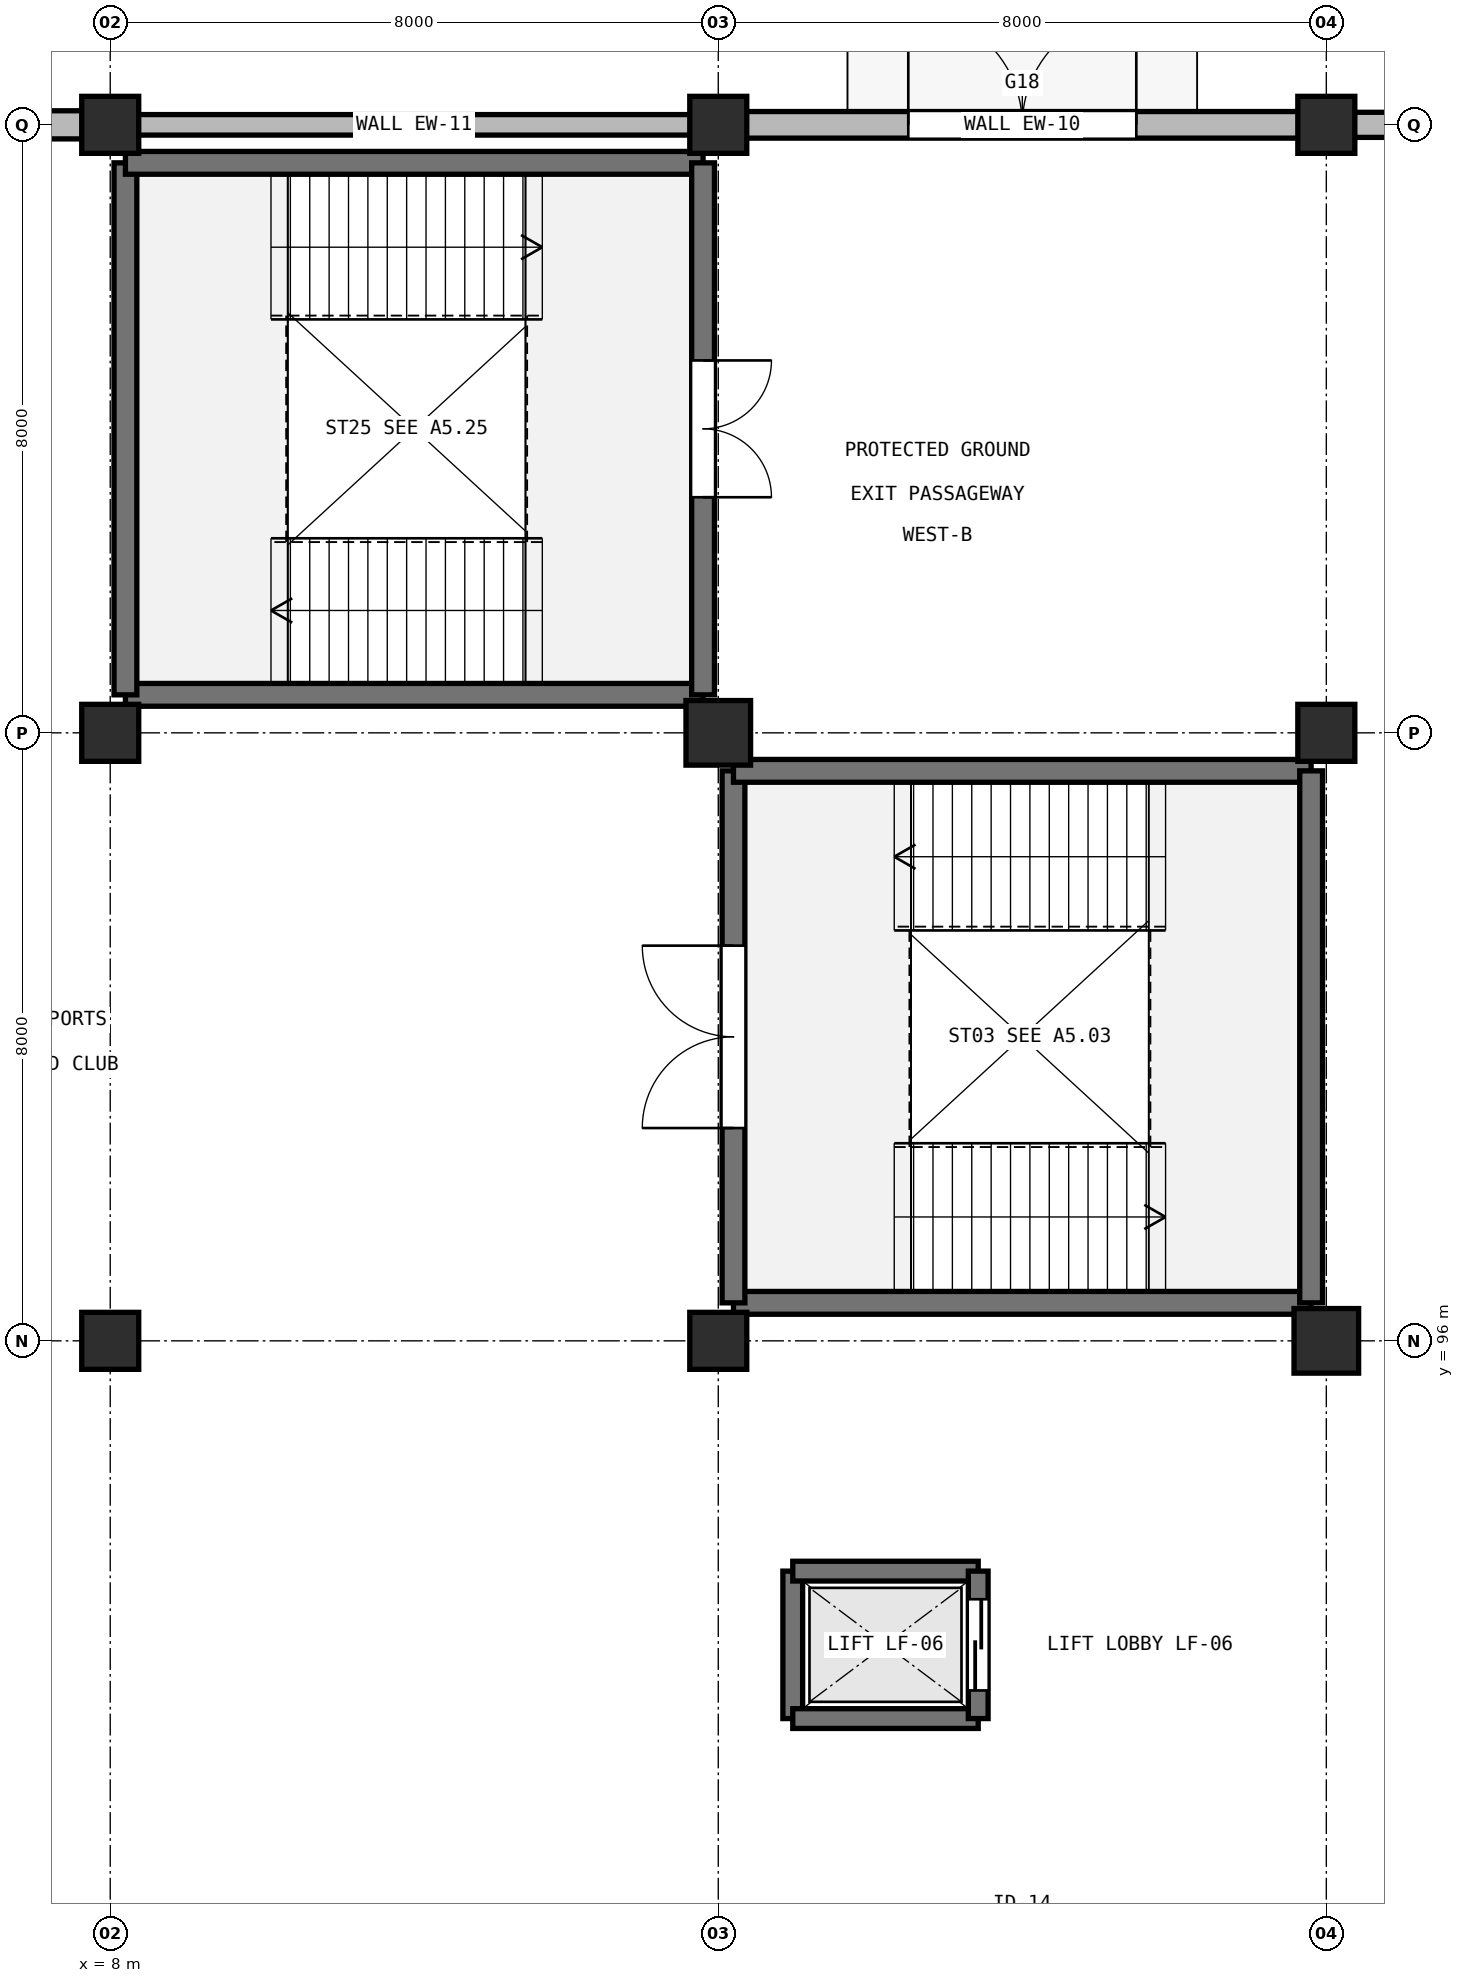
"""IFC4 building model, lengths in metres.
Left out: names, types, materials, properties, quantities, classifications, styles, units other than length and angle.
Written with IfcOpenShell. Run it as: python <this file> out.ifc"""

import sys

from ifc_helpers import new_model, si_unit, direction, frame, frame_2d, origin, origin_2d, place, context, subcontext, project, spatial, rectangle, extrude, element, fill, save


model = new_model("IFC4")
c1 = context("Model", 3, precision=1e-05, world=origin(), true_north=direction((0.0, 1.0)))
c2 = subcontext(c1, "Body", "Model", "MODEL_VIEW")
j1 = project(units=[si_unit("LENGTHUNIT", "METRE"), si_unit("PLANEANGLEUNIT", "RADIAN")], contexts=[c1])
p1 = place(None, origin())
s1 = spatial("IfcSite", under=j1, at=p1, CompositionType="ELEMENT")
p2 = place(p1, origin())
s2 = spatial("IfcBuilding", under=s1, at=p2, CompositionType="ELEMENT")
p3 = place(p2, origin())
s3 = spatial("IfcBuildingStorey", under=s2, at=p3, CompositionType="ELEMENT", Elevation=0.0)
for number, where, z_axis, x_axis in (
    (1, (8.0, 96.0, 0.0), (0.0, 0.0, 1.0), (1.0, 0.0, 0.0)),
    (2, (8.0, 104.0, 0.0), (0.0, 0.0, 1.0), (1.0, 0.0, 0.0)),
    (3, (8.0, 112.0, 0.0), (0.0, 0.0, 1.0), (1.0, 0.0, 0.0)),
    (4, (16.0, 96.0, 0.0), (0.0, 0.0, 1.0), (1.0, 0.0, 0.0)),
):
    element("IfcColumn", number, at=place(p3, frame(where, z_axis=z_axis, x_axis=x_axis)), inside=s3, PredefinedType="COLUMN", context=c2, shape_type="SweptSolid", body=[
        extrude(rectangle(XDim=0.75, YDim=0.75, at=origin_2d()), origin(), (0.0, 0.0, 1.0), 5.4),
    ])
p4 = place(p3, frame((16.0, 104.0, 0.0), z_axis=(0.0, 0.0, 1.0), x_axis=(1.0, 0.0, 0.0)))
e5 = element("IfcColumn", 5, at=p4, inside=s3, PredefinedType="COLUMN", context=c2, shape_type="SweptSolid", body=[
    extrude(rectangle(XDim=0.85, YDim=0.85, at=origin_2d()), origin(), (0.0, 0.0, 1.0), 5.4),
])
p5 = place(p3, frame((16.0, 112.0, 0.0), z_axis=(0.0, 0.0, 1.0), x_axis=(1.0, 0.0, 0.0)))
e6 = element("IfcColumn", 6, at=p5, inside=s3, PredefinedType="COLUMN", context=c2, shape_type="SweptSolid", body=[
    extrude(rectangle(XDim=0.75, YDim=0.75, at=origin_2d()), origin(), (0.0, 0.0, 1.0), 5.4),
])
p6 = place(p3, frame((24.0, 96.0, 0.0), z_axis=(0.0, 0.0, 1.0), x_axis=(1.0, 0.0, 0.0)))
e7 = element("IfcColumn", 7, at=p6, inside=s3, PredefinedType="COLUMN", context=c2, shape_type="SweptSolid", body=[
    extrude(rectangle(XDim=0.85, YDim=0.85, at=origin_2d()), origin(), (0.0, 0.0, 1.0), 5.4),
])
for number, where, z_axis, x_axis in (
    (8, (24.0, 104.0, 0.0), (0.0, 0.0, 1.0), (1.0, 0.0, 0.0)),
    (9, (24.0, 112.0, 0.0), (0.0, 0.0, 1.0), (1.0, 0.0, 0.0)),
):
    element("IfcColumn", number, at=place(p3, frame(where, z_axis=z_axis, x_axis=x_axis)), inside=s3, PredefinedType="COLUMN", context=c2, shape_type="SweptSolid", body=[
        extrude(rectangle(XDim=0.75, YDim=0.75, at=origin_2d()), origin(), (0.0, 0.0, 1.0), 5.4),
    ])
p7 = place(p3, frame((24.355, 112.0, 0.0), z_axis=(0.0, 0.0, 1.0), x_axis=(1.0, 0.0, 0.0)))
e10 = element("IfcWall", 10, at=p7, inside=s3, PredefinedType="SOLIDWALL", context=c2, shape_type="SweptSolid", body=[
    extrude(rectangle(XDim=7.29, YDim=0.33, at=frame_2d((3.645, 0.0))), origin(), (0.0, 0.0, 1.0), 4.2),
])
p8 = place(p7, frame((2.145, 0.0, 0.0)))
e11 = element("IfcOpeningElement", 11, at=p8, cuts=e10, PredefinedType="OPENING", context=c2, shape_type="SweptSolid", body=[
    extrude(rectangle(XDim=3.0, YDim=2.4, at=frame_2d((1.5, 1.2))), frame((0.0, 0.175, 0.0), z_axis=(0.0, -1.0, 0.0), x_axis=(1.0, 0.0, 0.0)), (0.0, 0.0, 1.0), 0.35),
])
p9 = place(p3, frame((16.355, 112.0, 0.0), z_axis=(0.0, 0.0, 1.0), x_axis=(1.0, 0.0, 0.0)))
e12 = element("IfcWall", 12, at=p9, inside=s3, PredefinedType="SOLIDWALL", context=c2, shape_type="SweptSolid", body=[
    extrude(rectangle(XDim=7.29, YDim=0.35, at=frame_2d((3.645, 0.0))), origin(), (0.0, 0.0, 1.0), 4.2),
])
p10 = place(p9, frame((2.145, 0.0, 0.0)))
e13 = element("IfcOpeningElement", 13, at=p10, cuts=e12, PredefinedType="OPENING", context=c2, shape_type="SweptSolid", body=[
    extrude(rectangle(XDim=3.0, YDim=2.4, at=frame_2d((1.5, 1.2))), frame((0.0, 0.185, 0.0), z_axis=(0.0, -1.0, 0.0), x_axis=(1.0, 0.0, 0.0)), (0.0, 0.0, 1.0), 0.37),
])
p11 = place(p3, frame((8.355, 112.0, 0.0), z_axis=(0.0, 0.0, 1.0), x_axis=(1.0, 0.0, 0.0)))
e14 = element("IfcWall", 14, at=p11, inside=s3, PredefinedType="SOLIDWALL", context=c2, shape_type="SweptSolid", body=[
    extrude(rectangle(XDim=7.29, YDim=0.27, at=frame_2d((3.645, 0.0))), origin(), (0.0, 0.0, 1.0), 4.2),
])
p12 = place(p3, frame((0.355, 112.0, 0.0), z_axis=(0.0, 0.0, 1.0), x_axis=(1.0, 0.0, 0.0)))
e15 = element("IfcWall", 15, at=p12, inside=s3, PredefinedType="SOLIDWALL", context=c2, shape_type="SweptSolid", body=[
    extrude(rectangle(XDim=7.29, YDim=0.37, at=frame_2d((3.645, 0.0))), origin(), (0.0, 0.0, 1.0), 4.2),
])
p13 = place(p12, frame((2.145, 0.0, 0.0)))
e16 = element("IfcOpeningElement", 16, at=p13, cuts=e15, PredefinedType="OPENING", context=c2, shape_type="SweptSolid", body=[
    extrude(rectangle(XDim=3.0, YDim=2.4, at=frame_2d((1.5, 1.2))), frame((0.0, 0.195, 0.0), z_axis=(0.0, -1.0, 0.0), x_axis=(1.0, 0.0, 0.0)), (0.0, 0.0, 1.0), 0.39),
])
p14 = place(p3, frame((23.8, 96.5, 0.0), z_axis=(0.0, 0.0, 1.0), x_axis=(-1.0, 0.0, 0.0)))
e17 = element("IfcWall", 17, at=p14, inside=s3, PredefinedType="SHEAR", context=c2, shape_type="SweptSolid", body=[
    extrude(rectangle(XDim=7.6, YDim=0.3, at=frame_2d((3.8, 0.0))), origin(), (0.0, 0.0, 1.0), 5.08),
])
p15 = place(p3, frame((16.2, 96.5, 0.0), z_axis=(0.0, 0.0, 1.0), x_axis=(0.0, 1.0, 0.0)))
e18 = element("IfcWall", 18, at=p15, inside=s3, PredefinedType="SHEAR", context=c2, shape_type="SweptSolid", body=[
    extrude(rectangle(XDim=7.0, YDim=0.3, at=frame_2d((3.5, 0.0))), origin(), (0.0, 0.0, 1.0), 5.08),
])
p16 = place(p15, frame((2.3, 0.0, 0.0)))
e19 = element("IfcOpeningElement", 19, at=p16, cuts=e18, PredefinedType="OPENING", context=c2, shape_type="SweptSolid", body=[
    extrude(rectangle(XDim=2.4, YDim=2.2, at=frame_2d((1.2, 1.1))), frame((0.0, 0.16, 0.0), z_axis=(0.0, -1.0, 0.0), x_axis=(1.0, 0.0, 0.0)), (0.0, 0.0, 1.0), 0.32),
])
p17 = place(p3, frame((16.2, 103.5, 0.0), z_axis=(0.0, 0.0, 1.0), x_axis=(1.0, 0.0, 0.0)))
e20 = element("IfcWall", 20, at=p17, inside=s3, PredefinedType="SHEAR", context=c2, shape_type="SweptSolid", body=[
    extrude(rectangle(XDim=7.6, YDim=0.3, at=frame_2d((3.8, 0.0))), origin(), (0.0, 0.0, 1.0), 5.08),
])
p18 = place(p3, frame((23.8, 103.5, 0.0), z_axis=(0.0, 0.0, 1.0), x_axis=(0.0, -1.0, 0.0)))
e21 = element("IfcWall", 21, at=p18, inside=s3, PredefinedType="SHEAR", context=c2, shape_type="SweptSolid", body=[
    extrude(rectangle(XDim=7.0, YDim=0.3, at=frame_2d((3.5, 0.0))), origin(), (0.0, 0.0, 1.0), 5.08),
])
p19 = place(p3, frame((15.8, 104.5, 0.0), z_axis=(0.0, 0.0, 1.0), x_axis=(-1.0, 0.0, 0.0)))
e22 = element("IfcWall", 22, at=p19, inside=s3, PredefinedType="SHEAR", context=c2, shape_type="SweptSolid", body=[
    extrude(rectangle(XDim=7.6, YDim=0.3, at=frame_2d((3.8, 0.0))), origin(), (0.0, 0.0, 1.0), 5.08),
])
p20 = place(p3, frame((8.2, 104.5, 0.0), z_axis=(0.0, 0.0, 1.0), x_axis=(0.0, 1.0, 0.0)))
e23 = element("IfcWall", 23, at=p20, inside=s3, PredefinedType="SHEAR", context=c2, shape_type="SweptSolid", body=[
    extrude(rectangle(XDim=7.0, YDim=0.3, at=frame_2d((3.5, 0.0))), origin(), (0.0, 0.0, 1.0), 5.08),
])
p21 = place(p3, frame((8.2, 111.5, 0.0), z_axis=(0.0, 0.0, 1.0), x_axis=(1.0, 0.0, 0.0)))
e24 = element("IfcWall", 24, at=p21, inside=s3, PredefinedType="SHEAR", context=c2, shape_type="SweptSolid", body=[
    extrude(rectangle(XDim=7.6, YDim=0.3, at=frame_2d((3.8, 0.0))), origin(), (0.0, 0.0, 1.0), 5.08),
])
p22 = place(p3, frame((15.8, 111.5, 0.0), z_axis=(0.0, 0.0, 1.0), x_axis=(0.0, -1.0, 0.0)))
e25 = element("IfcWall", 25, at=p22, inside=s3, PredefinedType="SHEAR", context=c2, shape_type="SweptSolid", body=[
    extrude(rectangle(XDim=7.0, YDim=0.3, at=frame_2d((3.5, 0.0))), origin(), (0.0, 0.0, 1.0), 5.08),
])
p23 = place(p22, frame((2.6, 0.0, 0.0)))
e26 = element("IfcOpeningElement", 26, at=p23, cuts=e25, PredefinedType="OPENING", context=c2, shape_type="SweptSolid", body=[
    extrude(rectangle(XDim=1.8, YDim=2.2, at=frame_2d((0.9, 1.1))), frame((0.0, 0.16, 0.0), z_axis=(0.0, -1.0, 0.0), x_axis=(1.0, 0.0, 0.0)), (0.0, 0.0, 1.0), 0.32),
])
p24 = place(p3, frame((16.98, 91.03, 0.0), z_axis=(0.0, 0.0, 1.0), x_axis=(0.0, 1.0, 0.0)))
e27 = element("IfcWall", 27, at=p24, inside=s3, PredefinedType="SHEAR", context=c2, shape_type="SweptSolid", body=[
    extrude(rectangle(XDim=1.94, YDim=0.26, at=frame_2d((0.97, 0.0))), origin(), (0.0, 0.0, 1.0), 5.08),
])
for number, where, z_axis, x_axis in (
    (28, (16.98, 92.97, 0.0), (0.0, 0.0, 1.0), (1.0, 0.0, 0.0)),
    (29, (19.42, 91.03, 0.0), (0.0, 0.0, 1.0), (-1.0, 0.0, 0.0)),
):
    element("IfcWall", number, at=place(p3, frame(where, z_axis=z_axis, x_axis=x_axis)), inside=s3, PredefinedType="SHEAR", context=c2, shape_type="SweptSolid", body=[
        extrude(rectangle(XDim=2.44, YDim=0.26, at=frame_2d((1.22, 0.0))), origin(), (0.0, 0.0, 1.0), 5.08),
    ])
p25 = place(p3, frame((19.42, 92.97, 0.0), z_axis=(0.0, 0.0, 1.0), x_axis=(0.0, -1.0, 0.0)))
e30 = element("IfcWall", 30, at=p25, inside=s3, PredefinedType="SHEAR", context=c2, shape_type="SweptSolid", body=[
    extrude(rectangle(XDim=1.94, YDim=0.26, at=frame_2d((0.97, 0.0))), origin(), (0.0, 0.0, 1.0), 5.08),
])
p26 = place(p25, frame((0.37, 0.0, 0.0)))
e31 = element("IfcOpeningElement", 31, at=p26, cuts=e30, PredefinedType="OPENING", context=c2, shape_type="SweptSolid", body=[
    extrude(rectangle(XDim=1.2, YDim=2.15, at=frame_2d((0.6, 1.075))), frame((0.0, 0.14, 0.0), z_axis=(0.0, -1.0, 0.0), x_axis=(1.0, 0.0, 0.0)), (0.0, 0.0, 1.0), 0.28),
])
p27 = place(p10, origin())
e32 = element("IfcDoor", 32, at=p27, inside=s3, OperationType="DOUBLE_DOOR_SINGLE_SWING", PredefinedType="DOOR", context=c2, shape_type="SweptSolid", body=[
    extrude(rectangle(XDim=3.0, YDim=2.4, at=frame_2d((1.5, 1.2))), frame((0.0, 0.025, 0.0), z_axis=(0.0, -1.0, 0.0), x_axis=(1.0, 0.0, 0.0)), (0.0, 0.0, 1.0), 0.05),
])
fill(e13, e32)
p28 = place(p16, origin())
e33 = element("IfcDoor", 33, at=p28, inside=s3, OperationType="DOUBLE_DOOR_SINGLE_SWING", PredefinedType="DOOR", context=c2, shape_type="SweptSolid", body=[
    extrude(rectangle(XDim=2.4, YDim=2.2, at=frame_2d((1.2, 1.1))), frame((0.0, 0.025, 0.0), z_axis=(0.0, -1.0, 0.0), x_axis=(1.0, 0.0, 0.0)), (0.0, 0.0, 1.0), 0.05),
])
fill(e19, e33)
p29 = place(p23, origin())
e34 = element("IfcDoor", 34, at=p29, inside=s3, OperationType="DOUBLE_DOOR_SINGLE_SWING", PredefinedType="DOOR", context=c2, shape_type="SweptSolid", body=[
    extrude(rectangle(XDim=1.8, YDim=2.2, at=frame_2d((0.9, 1.1))), frame((0.0, 0.025, 0.0), z_axis=(0.0, -1.0, 0.0), x_axis=(1.0, 0.0, 0.0)), (0.0, 0.0, 1.0), 0.05),
])
fill(e26, e34)
p30 = place(p26, origin())
e35 = element("IfcDoor", 35, at=p30, inside=s3, OperationType="SLIDING_TO_LEFT", PredefinedType="DOOR", context=c2, shape_type="SweptSolid", body=[
    extrude(rectangle(XDim=1.2, YDim=2.15, at=frame_2d((0.6, 1.075))), frame((0.0, 0.025, 0.0), z_axis=(0.0, -1.0, 0.0), x_axis=(1.0, 0.0, 0.0)), (0.0, 0.0, 1.0), 0.05),
])
fill(e31, e35)
save(model, sys.argv[1])
